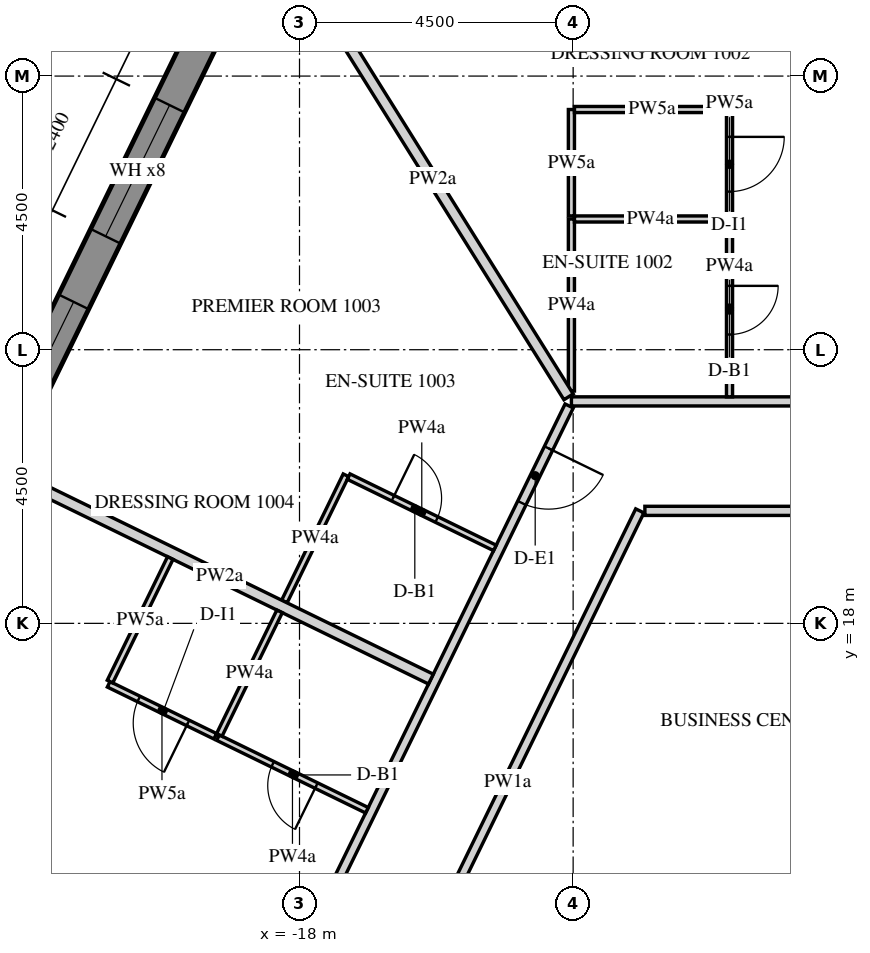
"""IFC4 building model, lengths in metres.
Left out: names, types, materials, properties, quantities, classifications, styles, units other than length and angle.
Written with IfcOpenShell. Run it as: python <this file> out.ifc"""

import sys

from ifc_helpers import new_model, si_unit, direction, frame, frame_2d, origin, place, context, subcontext, project, spatial, polyline, rectangle, outline, extrude, element, fill, save


model = new_model("IFC4")
c1 = context("Model", 3, precision=1e-05, world=origin(), true_north=direction((0.0, 1.0)))
c2 = subcontext(c1, "Body", "Model", "MODEL_VIEW")
j1 = project(units=[si_unit("LENGTHUNIT", "METRE"), si_unit("PLANEANGLEUNIT", "RADIAN")], contexts=[c1])
p1 = place(None, origin())
s1 = spatial("IfcSite", under=j1, at=p1, CompositionType="ELEMENT")
p2 = place(p1, origin())
s2 = spatial("IfcBuilding", under=s1, at=p2, CompositionType="ELEMENT")
p3 = place(p2, frame((0.0, 0.0, 142.8)))
s3 = spatial("IfcBuildingStorey", under=s2, at=p3, CompositionType="ELEMENT", Elevation=142.8)
p4 = place(p3, frame((-19.595, 27.633, -0.15), z_axis=(0.0, 0.0, 1.0), x_axis=(-0.438368285794, -0.898795441694, 0.0)))
e1 = element("IfcWall", 1, at=p4, inside=s3, PredefinedType="SOLIDWALL", context=c2, shape_type="SweptSolid", body=[
    extrude(outline(polyline([(-0.026, -0.275), (30.093, -0.275), (30.048, 0.275), (0.026, 0.275), (-0.026, -0.275)])), origin(), (0.0, 0.0, 1.0), 3.75),
])
p5 = place(p4, frame((1.236, 0.0, 1.05)))
e2 = element("IfcOpeningElement", 2, at=p5, cuts=e1, PredefinedType="OPENING", context=c2, shape_type="SweptSolid", body=[
    extrude(rectangle(XDim=2.4, YDim=2.4, at=frame_2d((1.2, 1.2))), frame((0.0, 0.285, 0.0), z_axis=(0.0, -1.0, 0.0), x_axis=(1.0, 0.0, 0.0)), (0.0, 0.0, 1.0), 0.57),
])
p6 = place(p4, frame((4.835, 0.0, 1.05)))
e3 = element("IfcOpeningElement", 3, at=p6, cuts=e1, PredefinedType="OPENING", context=c2, shape_type="SweptSolid", body=[
    extrude(rectangle(XDim=2.4, YDim=2.4, at=frame_2d((1.2, 1.2))), frame((0.0, 0.285, 0.0), z_axis=(0.0, -1.0, 0.0), x_axis=(1.0, 0.0, 0.0)), (0.0, 0.0, 1.0), 0.57),
])
p7 = place(p4, frame((8.436, 0.0, 1.05)))
e4 = element("IfcOpeningElement", 4, at=p7, cuts=e1, PredefinedType="OPENING", context=c2, shape_type="SweptSolid", body=[
    extrude(rectangle(XDim=2.4, YDim=2.4, at=frame_2d((1.2, 1.2))), frame((0.0, 0.285, 0.0), z_axis=(0.0, -1.0, 0.0), x_axis=(1.0, 0.0, 0.0)), (0.0, 0.0, 1.0), 0.57),
])
p8 = place(p4, frame((12.035, 0.0, 1.05)))
e5 = element("IfcOpeningElement", 5, at=p8, cuts=e1, PredefinedType="OPENING", context=c2, shape_type="SweptSolid", body=[
    extrude(rectangle(XDim=2.4, YDim=2.4, at=frame_2d((1.2, 1.2))), frame((0.0, 0.285, 0.0), z_axis=(0.0, -1.0, 0.0), x_axis=(1.0, 0.0, 0.0)), (0.0, 0.0, 1.0), 0.57),
])
p9 = place(p4, frame((15.635, 0.0, 1.05)))
e6 = element("IfcOpeningElement", 6, at=p9, cuts=e1, PredefinedType="OPENING", context=c2, shape_type="SweptSolid", body=[
    extrude(rectangle(XDim=2.4, YDim=2.4, at=frame_2d((1.2, 1.2))), frame((0.0, 0.285, 0.0), z_axis=(0.0, -1.0, 0.0), x_axis=(1.0, 0.0, 0.0)), (0.0, 0.0, 1.0), 0.57),
])
p10 = place(p4, frame((19.236, 0.0, 1.05)))
e7 = element("IfcOpeningElement", 7, at=p10, cuts=e1, PredefinedType="OPENING", context=c2, shape_type="SweptSolid", body=[
    extrude(rectangle(XDim=2.4, YDim=2.4, at=frame_2d((1.2, 1.2))), frame((0.0, 0.285, 0.0), z_axis=(0.0, -1.0, 0.0), x_axis=(1.0, 0.0, 0.0)), (0.0, 0.0, 1.0), 0.57),
])
p11 = place(p4, frame((22.835, 0.0, 1.05)))
e8 = element("IfcOpeningElement", 8, at=p11, cuts=e1, PredefinedType="OPENING", context=c2, shape_type="SweptSolid", body=[
    extrude(rectangle(XDim=2.4, YDim=2.4, at=frame_2d((1.2, 1.2))), frame((0.0, 0.285, 0.0), z_axis=(0.0, -1.0, 0.0), x_axis=(1.0, 0.0, 0.0)), (0.0, 0.0, 1.0), 0.57),
])
p12 = place(p4, frame((26.436, 0.0, 1.05)))
e9 = element("IfcOpeningElement", 9, at=p12, cuts=e1, PredefinedType="OPENING", context=c2, shape_type="SweptSolid", body=[
    extrude(rectangle(XDim=2.4, YDim=2.4, at=frame_2d((1.2, 1.2))), frame((0.0, 0.285, 0.0), z_axis=(0.0, -1.0, 0.0), x_axis=(1.0, 0.0, 0.0)), (0.0, 0.0, 1.0), 0.57),
])
p13 = place(p3, frame((-7.91, 13.7, -0.15), z_axis=(0.0, 0.0, 1.0), x_axis=(-0.499999880136, -0.866025472988, 0.0)))
e10 = element("IfcWall", 10, at=p13, inside=s3, PredefinedType="SHEAR", context=c2, shape_type="SweptSolid", body=[
    extrude(outline(polyline([(-0.173, -0.3), (15.993, -0.3), (15.646, 0.3), (0.173, 0.3), (-0.173, -0.3)])), origin(), (0.0, 0.0, 1.0), 3.75),
])
p14 = place(p13, frame((7.039, 0.0, 0.15)))
e11 = element("IfcOpeningElement", 11, at=p14, cuts=e10, PredefinedType="OPENING", context=c2, shape_type="SweptSolid", body=[
    extrude(rectangle(XDim=1.8, YDim=2.4, at=frame_2d((0.9, 1.2))), frame((0.0, 0.31, 0.0), z_axis=(0.0, -1.0, 0.0), x_axis=(1.0, 0.0, 0.0)), (0.0, 0.0, 1.0), 0.62),
])
p15 = place(p3, frame((9.988, 21.65, 0.0), z_axis=(0.0, 0.0, 1.0), x_axis=(-1.0, 0.0, 0.0)))
e12 = element("IfcWall", 12, at=p15, inside=s3, PredefinedType="PARTITIONING", context=c2, shape_type="SweptSolid", body=[
    extrude(rectangle(XDim=23.516, YDim=0.15, at=frame_2d((11.758, 0.0))), origin(), (0.0, 0.0, 1.0), 2.838),
])
p16 = place(p15, frame((3.856, 0.0, 0.0)))
e13 = element("IfcOpeningElement", 13, at=p16, cuts=e12, PredefinedType="OPENING", context=c2, shape_type="SweptSolid", body=[
    extrude(rectangle(XDim=1.0, YDim=2.1, at=frame_2d((0.5, 1.05))), frame((0.0, 0.085, 0.0), z_axis=(0.0, -1.0, 0.0), x_axis=(1.0, 0.0, 0.0)), (0.0, 0.0, 1.0), 0.17),
])
p17 = place(p15, frame((15.558, 0.0, 0.0)))
e14 = element("IfcOpeningElement", 14, at=p17, cuts=e12, PredefinedType="OPENING", context=c2, shape_type="SweptSolid", body=[
    extrude(rectangle(XDim=1.0, YDim=2.1, at=frame_2d((0.5, 1.05))), frame((0.0, 0.085, 0.0), z_axis=(0.0, -1.0, 0.0), x_axis=(1.0, 0.0, 0.0)), (0.0, 0.0, 1.0), 0.17),
])
p18 = place(p3, frame((-13.565, 21.575, 0.0), z_axis=(0.0, 0.0, 1.0), x_axis=(-0.438378393111, -0.898790511996, 0.0)))
e15 = element("IfcWall", 15, at=p18, inside=s3, PredefinedType="PARTITIONING", context=c2, shape_type="SweptSolid", body=[
    extrude(rectangle(XDim=21.584, YDim=0.15, at=frame_2d((10.792, 0.0))), origin(), (0.0, 0.0, 1.0), 2.838),
])
p19 = place(p18, frame((0.775, 0.0, 0.0)))
e16 = element("IfcOpeningElement", 16, at=p19, cuts=e15, PredefinedType="OPENING", context=c2, shape_type="SweptSolid", body=[
    extrude(rectangle(XDim=1.0, YDim=2.1, at=frame_2d((0.5, 1.05))), frame((0.0, 0.085, 0.0), z_axis=(0.0, -1.0, 0.0), x_axis=(1.0, 0.0, 0.0)), (0.0, 0.0, 1.0), 0.17),
])
p20 = place(p18, frame((11.134, 0.0, 0.0)))
e17 = element("IfcOpeningElement", 17, at=p20, cuts=e15, PredefinedType="OPENING", context=c2, shape_type="SweptSolid", body=[
    extrude(rectangle(XDim=1.0, YDim=2.1, at=frame_2d((0.5, 1.05))), frame((0.0, 0.085, 0.0), z_axis=(0.0, -1.0, 0.0), x_axis=(1.0, 0.0, 0.0)), (0.0, 0.0, 1.0), 0.17),
])
p21 = place(p18, frame((16.801, 0.0, 0.0)))
e18 = element("IfcOpeningElement", 18, at=p21, cuts=e15, PredefinedType="OPENING", context=c2, shape_type="SweptSolid", body=[
    extrude(rectangle(XDim=1.0, YDim=2.1, at=frame_2d((0.5, 1.05))), frame((0.0, 0.085, 0.0), z_axis=(0.0, -1.0, 0.0), x_axis=(1.0, 0.0, 0.0)), (0.0, 0.0, 1.0), 0.17),
])
p22 = place(p3, frame((-16.751, 10.937, 0.0), z_axis=(0.0, 0.0, 1.0), x_axis=(0.438378523504, 0.898790448397, 0.0)))
e19 = element("IfcWall", 19, at=p22, inside=s3, PredefinedType="PARTITIONING", context=c2, shape_type="SweptSolid", body=[
    extrude(rectangle(XDim=9.917, YDim=0.15, at=frame_2d((4.958, 0.0))), origin(), (0.0, 0.0, 1.0), 2.838),
])
p23 = place(p3, frame((-12.32, 19.85, 0.0), z_axis=(0.0, 0.0, 1.0), x_axis=(1.0, 0.0, 0.0)))
e20 = element("IfcWall", 20, at=p23, inside=s3, PredefinedType="PARTITIONING", context=c2, shape_type="SweptSolid", body=[
    extrude(rectangle(XDim=11.57, YDim=0.15, at=frame_2d((5.785, 0.0))), origin(), (0.0, 0.0, 1.0), 2.838),
])
p24 = place(p23, frame((5.335, 0.0, 0.0)))
e21 = element("IfcOpeningElement", 21, at=p24, cuts=e20, PredefinedType="OPENING", context=c2, shape_type="SweptSolid", body=[
    extrude(rectangle(XDim=0.9, YDim=2.1, at=frame_2d((0.45, 1.05))), frame((0.0, 0.085, 0.0), z_axis=(0.0, -1.0, 0.0), x_axis=(1.0, 0.0, 0.0)), (0.0, 0.0, 1.0), 0.17),
])
p25 = place(p3, frame((-13.528, 21.821, 0.0), z_axis=(0.0, 0.0, 1.0), x_axis=(0.0, 1.0, 0.0)))
e22 = element("IfcWall", 22, at=p25, inside=s3, PredefinedType="PARTITIONING", context=c2, shape_type="SweptSolid", body=[
    extrude(rectangle(XDim=2.829, YDim=0.1, at=frame_2d((1.415, 0.0))), origin(), (0.0, 0.0, 1.0), 2.838),
])
p26 = place(p3, frame((-10.928, 24.65, 0.0), z_axis=(0.0, 0.0, 1.0), x_axis=(0.0, -1.0, 0.0)))
e23 = element("IfcWall", 23, at=p26, inside=s3, PredefinedType="PARTITIONING", context=c2, shape_type="SweptSolid", body=[
    extrude(rectangle(XDim=2.925, YDim=0.1, at=frame_2d((1.462, 0.0))), origin(), (0.0, 0.0, 1.0), 2.838),
])
p27 = place(p26, frame((1.1, 0.0, 0.0)))
e24 = element("IfcOpeningElement", 24, at=p27, cuts=e23, PredefinedType="OPENING", context=c2, shape_type="SweptSolid", body=[
    extrude(rectangle(XDim=0.8, YDim=2.1, at=frame_2d((0.4, 1.05))), frame((0.0, 0.06, 0.0), z_axis=(0.0, -1.0, 0.0), x_axis=(1.0, 0.0, 0.0)), (0.0, 0.0, 1.0), 0.12),
])
p28 = place(p3, frame((-13.528, 24.7, 0.0), z_axis=(0.0, 0.0, 1.0), x_axis=(0.0, 1.0, 0.0)))
e25 = element("IfcWall", 25, at=p28, inside=s3, PredefinedType="PARTITIONING", context=c2, shape_type="SweptSolid", body=[
    extrude(rectangle(XDim=1.75, YDim=0.1, at=frame_2d((0.875, 0.0))), origin(), (0.0, 0.0, 1.0), 2.838),
])
p29 = place(p3, frame((-13.479, 26.45, 0.0), z_axis=(0.0, 0.0, 1.0), x_axis=(1.0, 0.0, 0.0)))
e26 = element("IfcWall", 26, at=p29, inside=s3, PredefinedType="PARTITIONING", context=c2, shape_type="SweptSolid", body=[
    extrude(rectangle(XDim=2.55, YDim=0.1, at=frame_2d((1.275, 0.0))), origin(), (0.0, 0.0, 1.0), 2.838),
])
p30 = place(p3, frame((-10.928, 26.4, 0.0), z_axis=(0.0, 0.0, 1.0), x_axis=(0.0, -1.0, 0.0)))
e27 = element("IfcWall", 27, at=p30, inside=s3, PredefinedType="PARTITIONING", context=c2, shape_type="SweptSolid", body=[
    extrude(rectangle(XDim=1.7, YDim=0.1, at=frame_2d((0.85, 0.0))), origin(), (0.0, 0.0, 1.0), 2.838),
])
p31 = place(p30, frame((0.4, 0.0, 0.0)))
e28 = element("IfcOpeningElement", 28, at=p31, cuts=e27, PredefinedType="OPENING", context=c2, shape_type="SweptSolid", body=[
    extrude(rectangle(XDim=0.9, YDim=2.1, at=frame_2d((0.45, 1.05))), frame((0.0, 0.06, 0.0), z_axis=(0.0, -1.0, 0.0), x_axis=(1.0, 0.0, 0.0)), (0.0, 0.0, 1.0), 0.12),
])
p32 = place(p3, frame((-18.041, 28.871, 0.0), z_axis=(0.0, 0.0, 1.0), x_axis=(0.52994164425, -0.848034111159, 0.0)))
e29 = element("IfcWall", 29, at=p32, inside=s3, PredefinedType="PARTITIONING", context=c2, shape_type="SweptSolid", body=[
    extrude(rectangle(XDim=8.427, YDim=0.18, at=frame_2d((4.213, 0.0))), origin(), (0.0, 0.0, 1.0), 2.838),
])
p33 = place(p3, frame((-10.979, 24.65, 0.0), z_axis=(0.0, 0.0, 1.0), x_axis=(-1.0, 0.0, 0.0)))
e30 = element("IfcWall", 30, at=p33, inside=s3, PredefinedType="PARTITIONING", context=c2, shape_type="SweptSolid", body=[
    extrude(rectangle(XDim=2.5, YDim=0.1, at=frame_2d((1.25, 0.0))), origin(), (0.0, 0.0, 1.0), 2.838),
])
p34 = place(p3, frame((-18.249, 18.359, 0.0), z_axis=(0.0, 0.0, 1.0), x_axis=(0.438313261974, 0.898822276303, 0.0)))
e31 = element("IfcWall", 31, at=p34, inside=s3, PredefinedType="PARTITIONING", context=c2, shape_type="SweptSolid", body=[
    extrude(rectangle(XDim=2.31, YDim=0.1, at=frame_2d((1.155, 0.0))), origin(), (0.0, 0.0, 1.0), 2.838),
])
p35 = place(p3, frame((-17.191, 20.413, 0.0), z_axis=(0.0, 0.0, 1.0), x_axis=(0.898800897694, -0.438357099068, 0.0)))
e32 = element("IfcWall", 32, at=p35, inside=s3, PredefinedType="PARTITIONING", context=c2, shape_type="SweptSolid", body=[
    extrude(rectangle(XDim=2.675, YDim=0.1, at=frame_2d((1.337, 0.0))), origin(), (0.0, 0.0, 1.0), 2.838),
])
p36 = place(p35, frame((0.81, 0.0, 0.0)))
e33 = element("IfcOpeningElement", 33, at=p36, cuts=e32, PredefinedType="OPENING", context=c2, shape_type="SweptSolid", body=[
    extrude(rectangle(XDim=0.8, YDim=2.1, at=frame_2d((0.4, 1.05))), frame((0.0, 0.06, 0.0), z_axis=(0.0, -1.0, 0.0), x_axis=(1.0, 0.0, 0.0)), (0.0, 0.0, 1.0), 0.12),
])
p37 = place(p3, frame((-22.782, 20.47, 0.0), z_axis=(0.0, 0.0, 1.0), x_axis=(0.898789402655, -0.438380667542, 0.0)))
e34 = element("IfcWall", 34, at=p37, inside=s3, PredefinedType="PARTITIONING", context=c2, shape_type="SweptSolid", body=[
    extrude(rectangle(XDim=7.725, YDim=0.18, at=frame_2d((3.862, 0.0))), origin(), (0.0, 0.0, 1.0), 2.838),
])
p38 = place(p3, frame((-16.891, 14.926, 0.0), z_axis=(0.0, 0.0, 1.0), x_axis=(-0.898791692788, 0.43837597217, 0.0)))
e35 = element("IfcWall", 35, at=p38, inside=s3, PredefinedType="PARTITIONING", context=c2, shape_type="SweptSolid", body=[
    extrude(rectangle(XDim=2.725, YDim=0.1, at=frame_2d((1.363, 0.0))), origin(), (0.0, 0.0, 1.0), 2.838),
])
p39 = place(p38, frame((0.925, 0.0, 0.0)))
e36 = element("IfcOpeningElement", 36, at=p39, cuts=e35, PredefinedType="OPENING", context=c2, shape_type="SweptSolid", body=[
    extrude(rectangle(XDim=0.8, YDim=2.1, at=frame_2d((0.4, 1.05))), frame((0.0, 0.06, 0.0), z_axis=(0.0, -1.0, 0.0), x_axis=(1.0, 0.0, 0.0)), (0.0, 0.0, 1.0), 0.12),
])
p40 = place(p3, frame((-19.385, 16.143, 0.0), z_axis=(0.0, 0.0, 1.0), x_axis=(-0.898815368173, 0.438327427772, 0.0)))
e37 = element("IfcWall", 37, at=p40, inside=s3, PredefinedType="PARTITIONING", context=c2, shape_type="SweptSolid", body=[
    extrude(rectangle(XDim=1.95, YDim=0.1, at=frame_2d((0.975, 0.0))), origin(), (0.0, 0.0, 1.0), 2.838),
])
p41 = place(p40, frame((0.5, 0.0, 0.0)))
e38 = element("IfcOpeningElement", 38, at=p41, cuts=e37, PredefinedType="OPENING", context=c2, shape_type="SweptSolid", body=[
    extrude(rectangle(XDim=0.9, YDim=2.1, at=frame_2d((0.45, 1.05))), frame((0.0, 0.06, 0.0), z_axis=(0.0, -1.0, 0.0), x_axis=(1.0, 0.0, 0.0)), (0.0, 0.0, 1.0), 0.12),
])
p42 = place(p3, frame((-21.116, 17.042, 0.0), z_axis=(0.0, 0.0, 1.0), x_axis=(0.438334246956, 0.898812042613, 0.0)))
e39 = element("IfcWall", 39, at=p42, inside=s3, PredefinedType="PARTITIONING", context=c2, shape_type="SweptSolid", body=[
    extrude(rectangle(XDim=2.26, YDim=0.1, at=frame_2d((1.13, 0.0))), origin(), (0.0, 0.0, 1.0), 2.838),
])
p43 = place(p3, frame((-18.328, 18.197, 0.0), z_axis=(0.0, 0.0, 1.0), x_axis=(-0.438376807268, -0.898791285477, 0.0)))
e40 = element("IfcWall", 40, at=p43, inside=s3, PredefinedType="PARTITIONING", context=c2, shape_type="SweptSolid", body=[
    extrude(rectangle(XDim=2.26, YDim=0.1, at=frame_2d((1.13, 0.0))), origin(), (0.0, 0.0, 1.0), 2.838),
])
p44 = place(p5, frame((0.0, 0.205, 0.0)))
e41 = element("IfcWindow", 41, at=p44, inside=s3, PartitioningType="DOUBLE_PANEL_VERTICAL", PredefinedType="WINDOW", context=c2, shape_type="SweptSolid", body=[
    extrude(rectangle(XDim=2.4, YDim=2.4, at=frame_2d((1.2, 1.2))), frame((0.0, 0.03, 0.0), z_axis=(0.0, -1.0, 0.0), x_axis=(1.0, 0.0, 0.0)), (0.0, 0.0, 1.0), 0.06),
])
fill(e2, e41)
p45 = place(p6, frame((0.0, 0.205, 0.0)))
e42 = element("IfcWindow", 42, at=p45, inside=s3, PartitioningType="DOUBLE_PANEL_VERTICAL", PredefinedType="WINDOW", context=c2, shape_type="SweptSolid", body=[
    extrude(rectangle(XDim=2.4, YDim=2.4, at=frame_2d((1.2, 1.2))), frame((0.0, 0.03, 0.0), z_axis=(0.0, -1.0, 0.0), x_axis=(1.0, 0.0, 0.0)), (0.0, 0.0, 1.0), 0.06),
])
fill(e3, e42)
p46 = place(p27, origin())
e43 = element("IfcDoor", 43, at=p46, inside=s3, OperationType="SINGLE_SWING_LEFT", PredefinedType="DOOR", context=c2, shape_type="SweptSolid", body=[
    extrude(rectangle(XDim=0.8, YDim=2.1, at=frame_2d((0.4, 1.05))), frame((0.0, 0.025, 0.0), z_axis=(0.0, -1.0, 0.0), x_axis=(1.0, 0.0, 0.0)), (0.0, 0.0, 1.0), 0.05),
])
fill(e24, e43)
p47 = place(p31, origin())
e44 = element("IfcDoor", 44, at=p47, inside=s3, OperationType="SINGLE_SWING_RIGHT", PredefinedType="DOOR", context=c2, shape_type="SweptSolid", body=[
    extrude(rectangle(XDim=0.9, YDim=2.1, at=frame_2d((0.45, 1.05))), frame((0.0, 0.025, 0.0), z_axis=(0.0, -1.0, 0.0), x_axis=(1.0, 0.0, 0.0)), (0.0, 0.0, 1.0), 0.05),
])
fill(e28, e44)
p48 = place(p19, origin())
e45 = element("IfcDoor", 45, at=p48, inside=s3, OperationType="SINGLE_SWING_RIGHT", PredefinedType="DOOR", context=c2, shape_type="SweptSolid", body=[
    extrude(rectangle(XDim=1.0, YDim=2.1, at=frame_2d((0.5, 1.05))), frame((0.0, 0.025, 0.0), z_axis=(0.0, -1.0, 0.0), x_axis=(1.0, 0.0, 0.0)), (0.0, 0.0, 1.0), 0.05),
])
fill(e16, e45)
p49 = place(p36, origin())
e46 = element("IfcDoor", 46, at=p49, inside=s3, OperationType="SINGLE_SWING_RIGHT", PredefinedType="DOOR", context=c2, shape_type="SweptSolid", body=[
    extrude(rectangle(XDim=0.8, YDim=2.1, at=frame_2d((0.4, 1.05))), frame((0.0, 0.025, 0.0), z_axis=(0.0, -1.0, 0.0), x_axis=(1.0, 0.0, 0.0)), (0.0, 0.0, 1.0), 0.05),
])
fill(e33, e46)
p50 = place(p39, origin())
e47 = element("IfcDoor", 47, at=p50, inside=s3, OperationType="SINGLE_SWING_RIGHT", PredefinedType="DOOR", context=c2, shape_type="SweptSolid", body=[
    extrude(rectangle(XDim=0.8, YDim=2.1, at=frame_2d((0.4, 1.05))), frame((0.0, 0.025, 0.0), z_axis=(0.0, -1.0, 0.0), x_axis=(1.0, 0.0, 0.0)), (0.0, 0.0, 1.0), 0.05),
])
fill(e36, e47)
p51 = place(p41, origin())
e48 = element("IfcDoor", 48, at=p51, inside=s3, OperationType="SINGLE_SWING_LEFT", PredefinedType="DOOR", context=c2, shape_type="SweptSolid", body=[
    extrude(rectangle(XDim=0.9, YDim=2.1, at=frame_2d((0.45, 1.05))), frame((0.0, 0.025, 0.0), z_axis=(0.0, -1.0, 0.0), x_axis=(1.0, 0.0, 0.0)), (0.0, 0.0, 1.0), 0.05),
])
fill(e38, e48)
save(model, sys.argv[1])
